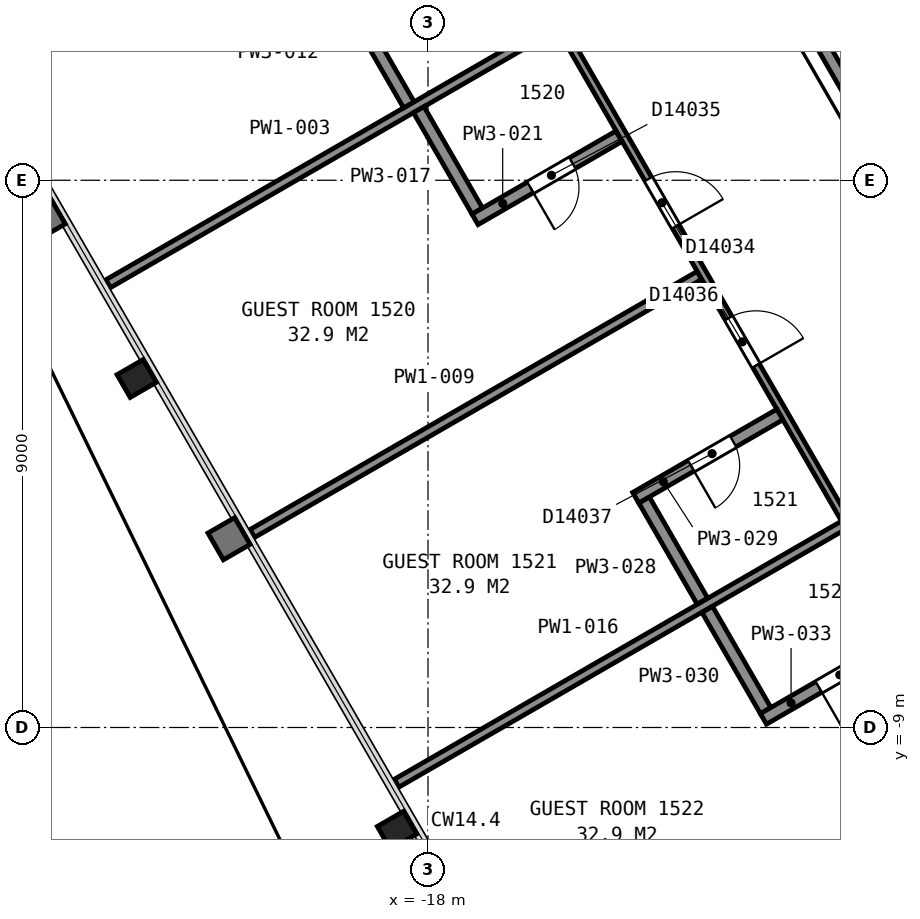
"""IFC4 building model, lengths in metres.
Left out: names, types, materials, properties, quantities, classifications, styles, units other than length and angle.
Written with IfcOpenShell. Run it as: python <this file> out.ifc"""

import sys

from ifc_helpers import new_model, si_unit, direction, frame, frame_2d, origin, origin_2d, place, context, subcontext, project, spatial, rectangle, i_section, extrude, element, fill, save


model = new_model("IFC4")
c1 = context("Model", 3, precision=1e-05, world=origin(), true_north=direction((0.0, 1.0)))
c2 = subcontext(c1, "Body", "Model", "MODEL_VIEW")
j1 = project(units=[si_unit("LENGTHUNIT", "METRE"), si_unit("PLANEANGLEUNIT", "RADIAN")], contexts=[c1])
p1 = place(None, origin())
s1 = spatial("IfcSite", under=j1, at=p1, CompositionType="ELEMENT")
p2 = place(p1, origin())
s2 = spatial("IfcBuilding", under=s1, at=p2, CompositionType="ELEMENT")
p3 = place(p2, frame((0.0, 0.0, 69.2)))
s3 = spatial("IfcBuildingStorey", under=s2, at=p3, CompositionType="ELEMENT", Elevation=69.2)
for number, where, z_axis, x_axis in (
    (1, (-22.79, -3.26, 0.0), (0.0, 0.0, 1.0), (-0.5, 0.866, 0.0)),
    (2, (-18.51, -10.69, 0.0), (0.0, 0.0, 1.0), (-0.5, 0.866, 0.0)),
):
    element("IfcColumn", number, at=place(p3, frame(where, z_axis=z_axis, x_axis=x_axis)), inside=s3, PredefinedType="COLUMN", context=c2, shape_type="SweptSolid", body=[
        extrude(i_section(OverallWidth=0.432, OverallDepth=0.498, WebThickness=0.056, FlangeThickness=0.089, FilletRadius=0.015, at=origin_2d()), origin(), (0.0, 0.0, 1.0), 3.575),
    ])
p4 = place(p3, frame((-13.664, 5.946, 0.0), z_axis=(0.0, 0.0, 1.0), x_axis=(0.499994327219, -0.866028678941, 0.0)))
e3 = element("IfcWall", 3, at=p4, inside=s3, PredefinedType="PARTITIONING", context=c2, shape_type="SweptSolid", body=[
    extrude(rectangle(XDim=23.968, YDim=0.2, at=frame_2d((11.984, 0.0))), origin(), (0.0, 0.0, 1.0), 3.35),
])
p5 = place(p3, frame((-23.26, -1.701, 0.0), z_axis=(0.0, 0.0, 1.0), x_axis=(0.866027021296, 0.499997198377, 0.0)))
e4 = element("IfcWall", 4, at=p5, inside=s3, PredefinedType="PARTITIONING", context=c2, shape_type="SweptSolid", body=[
    extrude(rectangle(XDim=8.487, YDim=0.15, at=frame_2d((4.243, 0.0))), origin(), (0.0, 0.0, 1.0), 2.613),
])
p6 = place(p3, frame((-20.889, -5.809, 0.0), z_axis=(0.0, 0.0, 1.0), x_axis=(0.866022790583, 0.50000452617, 0.0)))
e5 = element("IfcWall", 5, at=p6, inside=s3, PredefinedType="PARTITIONING", context=c2, shape_type="SweptSolid", body=[
    extrude(rectangle(XDim=8.491, YDim=0.15, at=frame_2d((4.246, 0.0))), origin(), (0.0, 0.0, 1.0), 2.613),
])
p7 = place(p3, frame((-19.327, 2.994, 0.0), z_axis=(0.0, 0.0, 1.0), x_axis=(0.500042536776, -0.866000843773, 0.0)))
e6 = element("IfcWall", 6, at=p7, inside=s3, PredefinedType="PARTITIONING", context=c2, shape_type="SweptSolid", body=[
    extrude(rectangle(XDim=2.025, YDim=0.2, at=frame_2d((1.012, 0.0))), origin(), (0.0, 0.0, 1.0), 2.613),
])
p8 = place(p3, frame((-18.517, -9.917, 0.0), z_axis=(0.0, 0.0, 1.0), x_axis=(0.866017528739, 0.50001363973, 0.0)))
e7 = element("IfcWall", 7, at=p8, inside=s3, PredefinedType="PARTITIONING", context=c2, shape_type="SweptSolid", body=[
    extrude(rectangle(XDim=8.491, YDim=0.15, at=frame_2d((4.246, 0.0))), origin(), (0.0, 0.0, 1.0), 2.613),
])
p9 = place(p3, frame((-18.153, 1.161, 0.0), z_axis=(0.0, 0.0, 1.0), x_axis=(0.499971247393, -0.866042003473, 0.0)))
e8 = element("IfcWall", 8, at=p9, inside=s3, PredefinedType="PARTITIONING", context=c2, shape_type="SweptSolid", body=[
    extrude(rectangle(XDim=1.925, YDim=0.2, at=frame_2d((0.963, 0.0))), origin(), (0.0, 0.0, 1.0), 2.613),
])
p10 = place(p3, frame((-3.766, -18.358, 0.0), z_axis=(0.0, 0.0, 1.0), x_axis=(-0.500003973642, 0.866023109589, 0.0)))
e9 = element("IfcWall", 9, at=p10, inside=s3, PredefinedType="PARTITIONING", context=c2, shape_type="SweptSolid", body=[
    extrude(rectangle(XDim=28.826, YDim=0.125, at=frame_2d((14.413, 0.0))), origin(), (0.0, 0.0, 1.0), 2.613),
])
p11 = place(p10, frame((27.114, 0.0, 0.0)))
e10 = element("IfcOpeningElement", 10, at=p11, cuts=e9, PredefinedType="OPENING", context=c2, shape_type="SweptSolid", body=[
    extrude(rectangle(XDim=0.9, YDim=2.1, at=frame_2d((0.45, 1.05))), frame((0.0, 0.073, 0.0), z_axis=(0.0, -1.0, 0.0), x_axis=(1.0, 0.0, 0.0)), (0.0, 0.0, 1.0), 0.145),
])
p12 = place(p10, frame((20.322, 0.0, 0.0)))
e11 = element("IfcOpeningElement", 11, at=p12, cuts=e9, PredefinedType="OPENING", context=c2, shape_type="SweptSolid", body=[
    extrude(rectangle(XDim=0.9, YDim=2.1, at=frame_2d((0.45, 1.05))), frame((0.0, 0.073, 0.0), z_axis=(0.0, -1.0, 0.0), x_axis=(1.0, 0.0, 0.0)), (0.0, 0.0, 1.0), 0.145),
])
p13 = place(p10, frame((17.68, 0.0, 0.0)))
e12 = element("IfcOpeningElement", 12, at=p13, cuts=e9, PredefinedType="OPENING", context=c2, shape_type="SweptSolid", body=[
    extrude(rectangle(XDim=0.9, YDim=2.1, at=frame_2d((0.45, 1.05))), frame((0.0, 0.073, 0.0), z_axis=(0.0, -1.0, 0.0), x_axis=(1.0, 0.0, 0.0)), (0.0, 0.0, 1.0), 0.145),
])
p14 = place(p10, frame((10.836, 0.0, 0.0)))
e13 = element("IfcOpeningElement", 13, at=p14, cuts=e9, PredefinedType="OPENING", context=c2, shape_type="SweptSolid", body=[
    extrude(rectangle(XDim=0.9, YDim=2.1, at=frame_2d((0.45, 1.05))), frame((0.0, 0.073, 0.0), z_axis=(0.0, -1.0, 0.0), x_axis=(1.0, 0.0, 0.0)), (0.0, 0.0, 1.0), 0.145),
])
p15 = place(p10, frame((7.342, 0.0, 0.0)))
e14 = element("IfcOpeningElement", 14, at=p15, cuts=e9, PredefinedType="OPENING", context=c2, shape_type="SweptSolid", body=[
    extrude(rectangle(XDim=0.9, YDim=2.1, at=frame_2d((0.45, 1.05))), frame((0.0, 0.073, 0.0), z_axis=(0.0, -1.0, 0.0), x_axis=(1.0, 0.0, 0.0)), (0.0, 0.0, 1.0), 0.145),
])
p16 = place(p3, frame((-17.227, -0.643, 0.0), z_axis=(0.0, 0.0, 1.0), x_axis=(0.866012976267, 0.500021524473, 0.0)))
e15 = element("IfcWall", 15, at=p16, inside=s3, PredefinedType="PARTITIONING", context=c2, shape_type="SweptSolid", body=[
    extrude(rectangle(XDim=2.732, YDim=0.2, at=frame_2d((1.366, 0.0))), origin(), (0.0, 0.0, 1.0), 2.613),
])
p17 = place(p16, frame((1.05, 0.0, 0.0)))
e16 = element("IfcOpeningElement", 16, at=p17, cuts=e15, PredefinedType="OPENING", context=c2, shape_type="SweptSolid", body=[
    extrude(rectangle(XDim=0.8, YDim=2.1, at=frame_2d((0.4, 1.05))), frame((0.0, 0.11, 0.0), z_axis=(0.0, -1.0, 0.0), x_axis=(1.0, 0.0, 0.0)), (0.0, 0.0, 1.0), 0.22),
])
p18 = place(p3, frame((-16.145, -14.025, 0.0), z_axis=(0.0, 0.0, 1.0), x_axis=(0.866024716685, 0.500001190089, 0.0)))
e17 = element("IfcWall", 17, at=p18, inside=s3, PredefinedType="PARTITIONING", context=c2, shape_type="SweptSolid", body=[
    extrude(rectangle(XDim=8.492, YDim=0.15, at=frame_2d((4.246, 0.0))), origin(), (0.0, 0.0, 1.0), 2.613),
])
p19 = place(p3, frame((-14.447, -5.258, 0.0), z_axis=(0.0, 0.0, 1.0), x_axis=(0.499667418833, -0.866217334482, 0.0)))
e18 = element("IfcWall", 18, at=p19, inside=s3, PredefinedType="PARTITIONING", context=c2, shape_type="SweptSolid", body=[
    extrude(rectangle(XDim=1.92, YDim=0.2, at=frame_2d((0.96, 0.0))), origin(), (0.0, 0.0, 1.0), 2.613),
])
p20 = place(p3, frame((-12.213, -3.852, 0.0), z_axis=(0.0, 0.0, 1.0), x_axis=(-0.866005850709, -0.50003386539, 0.0)))
e19 = element("IfcWall", 19, at=p20, inside=s3, PredefinedType="PARTITIONING", context=c2, shape_type="SweptSolid", body=[
    extrude(rectangle(XDim=2.737, YDim=0.2, at=frame_2d((1.369, 0.0))), origin(), (0.0, 0.0, 1.0), 2.613),
])
p21 = place(p20, frame((0.887, 0.0, 0.0)))
e20 = element("IfcOpeningElement", 20, at=p21, cuts=e19, PredefinedType="OPENING", context=c2, shape_type="SweptSolid", body=[
    extrude(rectangle(XDim=0.8, YDim=2.1, at=frame_2d((0.4, 1.05))), frame((0.0, 0.11, 0.0), z_axis=(0.0, -1.0, 0.0), x_axis=(1.0, 0.0, 0.0)), (0.0, 0.0, 1.0), 0.22),
])
p22 = place(p3, frame((-13.407, -7.059, 0.0), z_axis=(0.0, 0.0, 1.0), x_axis=(0.499993829411, -0.866028966346, 0.0)))
e21 = element("IfcWall", 21, at=p22, inside=s3, PredefinedType="PARTITIONING", context=c2, shape_type="SweptSolid", body=[
    extrude(rectangle(XDim=1.921, YDim=0.2, at=frame_2d((0.96, 0.0))), origin(), (0.0, 0.0, 1.0), 2.613),
])
p23 = place(p3, frame((-12.484, -8.859, 0.0), z_axis=(0.0, 0.0, 1.0), x_axis=(0.866028150195, 0.499995243048, 0.0)))
e22 = element("IfcWall", 22, at=p23, inside=s3, PredefinedType="PARTITIONING", context=c2, shape_type="SweptSolid", body=[
    extrude(rectangle(XDim=2.737, YDim=0.2, at=frame_2d((1.369, 0.0))), origin(), (0.0, 0.0, 1.0), 2.613),
])
p24 = place(p23, frame((1.05, 0.0, 0.0)))
e23 = element("IfcOpeningElement", 23, at=p24, cuts=e22, PredefinedType="OPENING", context=c2, shape_type="SweptSolid", body=[
    extrude(rectangle(XDim=0.8, YDim=2.1, at=frame_2d((0.4, 1.05))), frame((0.0, 0.11, 0.0), z_axis=(0.0, -1.0, 0.0), x_axis=(1.0, 0.0, 0.0)), (0.0, 0.0, 1.0), 0.22),
])
p25 = place(p12, origin())
e24 = element("IfcDoor", 24, at=p25, inside=s3, OperationType="SINGLE_SWING_LEFT", PredefinedType="DOOR", context=c2, shape_type="SweptSolid", body=[
    extrude(rectangle(XDim=0.9, YDim=2.1, at=frame_2d((0.45, 1.05))), frame((0.0, 0.025, 0.0), z_axis=(0.0, -1.0, 0.0), x_axis=(1.0, 0.0, 0.0)), (0.0, 0.0, 1.0), 0.05),
])
fill(e11, e24)
p26 = place(p13, origin())
e25 = element("IfcDoor", 25, at=p26, inside=s3, OperationType="SINGLE_SWING_LEFT", PredefinedType="DOOR", context=c2, shape_type="SweptSolid", body=[
    extrude(rectangle(XDim=0.9, YDim=2.1, at=frame_2d((0.45, 1.05))), frame((0.0, 0.025, 0.0), z_axis=(0.0, -1.0, 0.0), x_axis=(1.0, 0.0, 0.0)), (0.0, 0.0, 1.0), 0.05),
])
fill(e12, e25)
p27 = place(p17, origin())
e26 = element("IfcDoor", 26, at=p27, inside=s3, OperationType="SINGLE_SWING_LEFT", PredefinedType="DOOR", context=c2, shape_type="SweptSolid", body=[
    extrude(rectangle(XDim=0.8, YDim=2.1, at=frame_2d((0.4, 1.05))), frame((0.0, 0.025, 0.0), z_axis=(0.0, -1.0, 0.0), x_axis=(1.0, 0.0, 0.0)), (0.0, 0.0, 1.0), 0.05),
])
fill(e16, e26)
p28 = place(p21, origin())
e27 = element("IfcDoor", 27, at=p28, inside=s3, OperationType="SINGLE_SWING_RIGHT", PredefinedType="DOOR", context=c2, shape_type="SweptSolid", body=[
    extrude(rectangle(XDim=0.8, YDim=2.1, at=frame_2d((0.4, 1.05))), frame((0.0, 0.025, 0.0), z_axis=(0.0, -1.0, 0.0), x_axis=(1.0, 0.0, 0.0)), (0.0, 0.0, 1.0), 0.05),
])
fill(e20, e27)
p29 = place(p24, origin())
e28 = element("IfcDoor", 28, at=p29, inside=s3, OperationType="SINGLE_SWING_LEFT", PredefinedType="DOOR", context=c2, shape_type="SweptSolid", body=[
    extrude(rectangle(XDim=0.8, YDim=2.1, at=frame_2d((0.4, 1.05))), frame((0.0, 0.025, 0.0), z_axis=(0.0, -1.0, 0.0), x_axis=(1.0, 0.0, 0.0)), (0.0, 0.0, 1.0), 0.05),
])
fill(e23, e28)
save(model, sys.argv[1])
